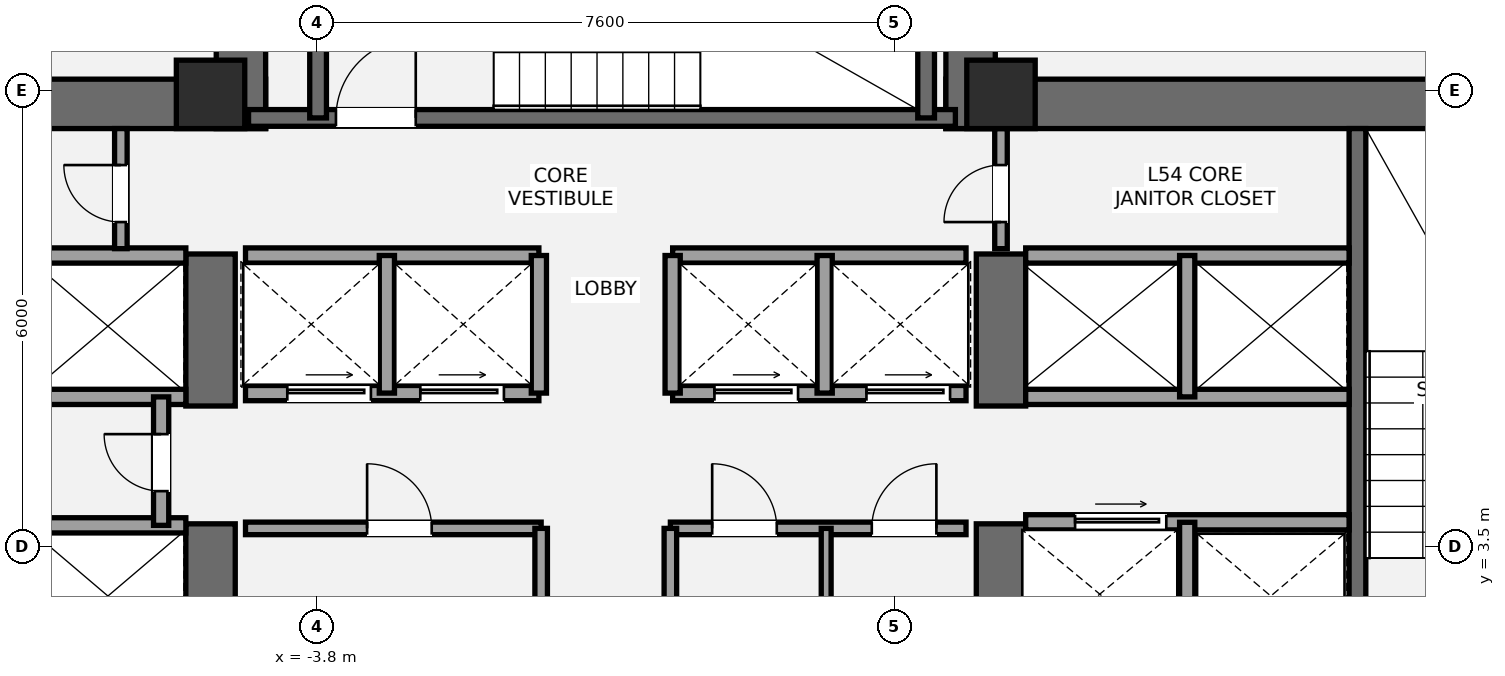
"""IFC4 building model, lengths in metres.
Left out: names, types, materials, properties, quantities, classifications, styles, units other than length and angle.
Written with IfcOpenShell. Run it as: python <this file> out.ifc"""

import sys

from ifc_helpers import new_model, si_unit, direction, frame, frame_2d, origin, origin_2d, place, context, subcontext, project, spatial, rectangle, extrude, element, fill, save


model = new_model("IFC4")
c1 = context("Model", 3, precision=1e-05, world=origin(), true_north=direction((0.0, 1.0)))
c2 = subcontext(c1, "Body", "Model", "MODEL_VIEW")
j1 = project(units=[si_unit("LENGTHUNIT", "METRE"), si_unit("PLANEANGLEUNIT", "RADIAN")], contexts=[c1])
p1 = place(None, origin())
s1 = spatial("IfcSite", under=j1, at=p1, CompositionType="ELEMENT")
p2 = place(p1, origin())
s2 = spatial("IfcBuilding", under=s1, at=p2, CompositionType="ELEMENT")
p3 = place(p2, frame((0.0, 0.0, 195.0)))
s3 = spatial("IfcBuildingStorey", under=s2, at=p3, CompositionType="ELEMENT", Elevation=195.0)
p4 = place(p3, frame((-13.8, 9.325, 0.0), z_axis=(0.0, 0.0, 1.0), x_axis=(1.0, 0.0, 0.0)))
e1 = element("IfcWall", 1, at=p4, inside=s3, PredefinedType="SHEAR", context=c2, shape_type="SweptSolid", body=[
    extrude(rectangle(XDim=9.325, YDim=0.65, at=frame_2d((4.663, 0.0))), origin(), (0.0, 0.0, 1.0), 3.2),
])
p5 = place(p3, frame((-5.2, 1.2, 0.0), z_axis=(0.0, 0.0, 1.0), x_axis=(0.0, 1.0, 0.0)))
e2 = element("IfcWall", 2, at=p5, inside=s3, PredefinedType="SHEAR", context=c2, shape_type="SweptSolid", body=[
    extrude(rectangle(XDim=2.6, YDim=0.65, at=frame_2d((1.3, 0.0))), origin(), (0.0, 0.0, 1.0), 3.2),
])
p6 = place(p3, frame((-5.2, 5.35, 0.0), z_axis=(0.0, 0.0, 1.0), x_axis=(0.0, 1.0, 0.0)))
e3 = element("IfcWall", 3, at=p6, inside=s3, PredefinedType="SHEAR", context=c2, shape_type="SweptSolid", body=[
    extrude(rectangle(XDim=2.0, YDim=0.65, at=frame_2d((1.0, 0.0))), origin(), (0.0, 0.0, 1.0), 3.2),
])
p7 = place(p3, frame((4.475, 9.325, 0.0), z_axis=(0.0, 0.0, 1.0), x_axis=(1.0, 0.0, 0.0)))
e4 = element("IfcWall", 4, at=p7, inside=s3, PredefinedType="SHEAR", context=c2, shape_type="SweptSolid", body=[
    extrude(rectangle(XDim=9.325, YDim=0.65, at=frame_2d((4.663, 0.0))), origin(), (0.0, 0.0, 1.0), 3.2),
])
p8 = place(p3, frame((5.2, 1.2, 0.0), z_axis=(0.0, 0.0, 1.0), x_axis=(0.0, 1.0, 0.0)))
e5 = element("IfcWall", 5, at=p8, inside=s3, PredefinedType="SHEAR", context=c2, shape_type="SweptSolid", body=[
    extrude(rectangle(XDim=2.6, YDim=0.65, at=frame_2d((1.3, 0.0))), origin(), (0.0, 0.0, 1.0), 3.2),
])
p9 = place(p3, frame((5.2, 5.35, 0.0), z_axis=(0.0, 0.0, 1.0), x_axis=(0.0, 1.0, 0.0)))
e6 = element("IfcWall", 6, at=p9, inside=s3, PredefinedType="SHEAR", context=c2, shape_type="SweptSolid", body=[
    extrude(rectangle(XDim=2.0, YDim=0.65, at=frame_2d((1.0, 0.0))), origin(), (0.0, 0.0, 1.0), 3.2),
])
p10 = place(p3, frame((9.89, 1.85, 0.0), z_axis=(0.0, 0.0, 1.0), x_axis=(0.0, 1.0, 0.0)))
e7 = element("IfcWall", 7, at=p10, inside=s3, PredefinedType="SHEAR", context=c2, shape_type="SweptSolid", body=[
    extrude(rectangle(XDim=7.15, YDim=0.22, at=frame_2d((3.575, 0.0))), origin(), (0.0, 0.0, 1.0), 3.2),
])
for number, where, z_axis, x_axis in (
    (8, (-4.8, 9.0, 0.0), (0.0, 0.0, 1.0), (0.0, 1.0, 0.0)),
    (9, (4.8, 9.0, 0.0), (0.0, 0.0, 1.0), (0.0, 1.0, 0.0)),
):
    element("IfcWall", number, at=place(p3, frame(where, z_axis=z_axis, x_axis=x_axis)), inside=s3, PredefinedType="SHEAR", context=c2, shape_type="SweptSolid", body=[
        extrude(rectangle(XDim=4.05, YDim=0.65, at=frame_2d((2.025, 0.0))), origin(), (0.0, 0.0, 1.0), 3.2),
    ])
p11 = place(p3, frame((-4.7, 9.14, 0.0), z_axis=(0.0, 0.0, 1.0), x_axis=(1.0, 0.0, 0.0)))
e10 = element("IfcWall", 10, at=p11, inside=s3, PredefinedType="SHEAR", context=c2, shape_type="SweptSolid", body=[
    extrude(rectangle(XDim=9.3, YDim=0.22, at=frame_2d((4.65, 0.0))), origin(), (0.0, 0.0, 1.0), 3.2),
])
p12 = place(p11, frame((1.15, 0.0, 0.0)))
e11 = element("IfcOpeningElement", 11, at=p12, cuts=e10, PredefinedType="OPENING", context=c2, shape_type="SweptSolid", body=[
    extrude(rectangle(XDim=1.05, YDim=2.15, at=frame_2d((0.525, 1.075))), frame((0.0, 0.12, 0.0), z_axis=(0.0, -1.0, 0.0), x_axis=(1.0, 0.0, 0.0)), (0.0, 0.0, 1.0), 0.24),
])
for number, where, z_axis, x_axis in (
    (12, (-3.785, 9.14, 0.0), (0.0, 0.0, 1.0), (0.0, 1.0, 0.0)),
    (13, (4.215, 9.14, 0.0), (0.0, 0.0, 1.0), (0.0, 1.0, 0.0)),
):
    element("IfcWall", number, at=place(p3, frame(where, z_axis=z_axis, x_axis=x_axis)), inside=s3, PredefinedType="SHEAR", context=c2, shape_type="SweptSolid", body=[
        extrude(rectangle(XDim=3.26, YDim=0.22, at=frame_2d((1.63, 0.0))), origin(), (0.0, 0.0, 1.0), 3.2),
    ])
for number, where, z_axis, x_axis in (
    (14, (-5.2, 9.45, 0.0), (0.0, 0.0, 1.0), (1.0, 0.0, 0.0)),
    (15, (5.2, 9.45, 0.0), (0.0, 0.0, 1.0), (1.0, 0.0, 0.0)),
):
    element("IfcColumn", number, at=place(p3, frame(where, z_axis=z_axis, x_axis=x_axis)), inside=s3, PredefinedType="COLUMN", context=c2, shape_type="SweptSolid", body=[
        extrude(rectangle(XDim=0.9, YDim=0.9, at=origin_2d()), origin(), (0.0, 0.0, 1.0), 3.2),
    ])
for number, where, z_axis, x_axis in (
    (16, (-9.78, 3.78, 0.0), (0.0, 0.0, 1.0), (1.0, 0.0, 0.0)),
    (17, (-9.78, 5.47, 0.0), (0.0, 0.0, 1.0), (1.0, 0.0, 0.0)),
    (18, (-9.78, 7.33, 0.0), (0.0, 0.0, 1.0), (1.0, 0.0, 0.0)),
):
    element("IfcWall", number, at=place(p3, frame(where, z_axis=z_axis, x_axis=x_axis)), inside=s3, PredefinedType="SOLIDWALL", context=c2, shape_type="SweptSolid", body=[
        extrude(rectangle(XDim=4.255, YDim=0.2, at=frame_2d((2.127, 0.0))), origin(), (0.0, 0.0, 1.0), 3.02),
    ])
p13 = place(p3, frame((-5.85, 3.78, 0.0), z_axis=(0.0, 0.0, 1.0), x_axis=(0.0, 1.0, 0.0)))
e19 = element("IfcWall", 19, at=p13, inside=s3, PredefinedType="SOLIDWALL", context=c2, shape_type="SweptSolid", body=[
    extrude(rectangle(XDim=1.69, YDim=0.2, at=frame_2d((0.845, 0.0))), origin(), (0.0, 0.0, 1.0), 3.02),
])
p14 = place(p13, frame((0.45, 0.0, 0.0)))
e20 = element("IfcOpeningElement", 20, at=p14, cuts=e19, PredefinedType="OPENING", context=c2, shape_type="SweptSolid", body=[
    extrude(rectangle(XDim=0.75, YDim=2.1, at=frame_2d((0.375, 1.05))), frame((0.0, 0.11, 0.0), z_axis=(0.0, -1.0, 0.0), x_axis=(1.0, 0.0, 0.0)), (0.0, 0.0, 1.0), 0.22),
])
p15 = place(p3, frame((5.525, 3.82, 0.0), z_axis=(0.0, 0.0, 1.0), x_axis=(1.0, 0.0, 0.0)))
e21 = element("IfcWall", 21, at=p15, inside=s3, PredefinedType="SOLIDWALL", context=c2, shape_type="SweptSolid", body=[
    extrude(rectangle(XDim=4.255, YDim=0.2, at=frame_2d((2.127, 0.0))), origin(), (0.0, 0.0, 1.0), 3.02),
])
p16 = place(p15, frame((0.65, 0.0, 0.0)))
e22 = element("IfcOpeningElement", 22, at=p16, cuts=e21, PredefinedType="OPENING", context=c2, shape_type="SweptSolid", body=[
    extrude(rectangle(XDim=1.2, YDim=2.2, at=frame_2d((0.6, 1.1))), frame((0.0, 0.11, 0.0), z_axis=(0.0, -1.0, 0.0), x_axis=(1.0, 0.0, 0.0)), (0.0, 0.0, 1.0), 0.22),
])
p17 = place(p3, frame((7.65, 1.85, 0.0), z_axis=(0.0, 0.0, 1.0), x_axis=(0.0, 1.0, 0.0)))
e23 = element("IfcWall", 23, at=p17, inside=s3, PredefinedType="SOLIDWALL", context=c2, shape_type="SweptSolid", body=[
    extrude(rectangle(XDim=1.97, YDim=0.2, at=frame_2d((0.985, 0.0))), origin(), (0.0, 0.0, 1.0), 3.02),
])
for number, where, z_axis, x_axis in (
    (24, (5.525, 5.47, 0.0), (0.0, 0.0, 1.0), (1.0, 0.0, 0.0)),
    (25, (5.525, 7.33, 0.0), (0.0, 0.0, 1.0), (1.0, 0.0, 0.0)),
):
    element("IfcWall", number, at=place(p3, frame(where, z_axis=z_axis, x_axis=x_axis)), inside=s3, PredefinedType="SOLIDWALL", context=c2, shape_type="SweptSolid", body=[
        extrude(rectangle(XDim=4.255, YDim=0.2, at=frame_2d((2.127, 0.0))), origin(), (0.0, 0.0, 1.0), 3.02),
    ])
p18 = place(p3, frame((7.65, 5.47, 0.0), z_axis=(0.0, 0.0, 1.0), x_axis=(0.0, 1.0, 0.0)))
e26 = element("IfcWall", 26, at=p18, inside=s3, PredefinedType="SOLIDWALL", context=c2, shape_type="SweptSolid", body=[
    extrude(rectangle(XDim=1.86, YDim=0.2, at=frame_2d((0.93, 0.0))), origin(), (0.0, 0.0, 1.0), 3.02),
])
p19 = place(p3, frame((-4.74, 3.74, 0.0), z_axis=(0.0, 0.0, 1.0), x_axis=(1.0, 0.0, 0.0)))
e27 = element("IfcWall", 27, at=p19, inside=s3, PredefinedType="PARTITIONING", context=c2, shape_type="SweptSolid", body=[
    extrude(rectangle(XDim=3.89, YDim=0.165, at=frame_2d((1.945, 0.0))), origin(), (0.0, 0.0, 1.0), 3.02),
])
p20 = place(p19, frame((1.6, 0.0, 0.0)))
e28 = element("IfcOpeningElement", 28, at=p20, cuts=e27, PredefinedType="OPENING", context=c2, shape_type="SweptSolid", body=[
    extrude(rectangle(XDim=0.85, YDim=2.1, at=frame_2d((0.425, 1.05))), frame((0.0, 0.093, 0.0), z_axis=(0.0, -1.0, 0.0), x_axis=(1.0, 0.0, 0.0)), (0.0, 0.0, 1.0), 0.185),
])
p21 = place(p3, frame((-0.85, 1.92, 0.0), z_axis=(0.0, 0.0, 1.0), x_axis=(0.0, 1.0, 0.0)))
e29 = element("IfcWall", 29, at=p21, inside=s3, PredefinedType="PARTITIONING", context=c2, shape_type="SweptSolid", body=[
    extrude(rectangle(XDim=1.82, YDim=0.165, at=frame_2d((0.91, 0.0))), origin(), (0.0, 0.0, 1.0), 3.02),
])
p22 = place(p3, frame((0.85, 3.74, 0.0), z_axis=(0.0, 0.0, 1.0), x_axis=(1.0, 0.0, 0.0)))
e30 = element("IfcWall", 30, at=p22, inside=s3, PredefinedType="PARTITIONING", context=c2, shape_type="SweptSolid", body=[
    extrude(rectangle(XDim=3.89, YDim=0.165, at=frame_2d((1.945, 0.0))), origin(), (0.0, 0.0, 1.0), 3.02),
])
p23 = place(p22, frame((0.55, 0.0, 0.0)))
e31 = element("IfcOpeningElement", 31, at=p23, cuts=e30, PredefinedType="OPENING", context=c2, shape_type="SweptSolid", body=[
    extrude(rectangle(XDim=0.85, YDim=2.1, at=frame_2d((0.425, 1.05))), frame((0.0, 0.093, 0.0), z_axis=(0.0, -1.0, 0.0), x_axis=(1.0, 0.0, 0.0)), (0.0, 0.0, 1.0), 0.185),
])
p24 = place(p22, frame((2.65, 0.0, 0.0)))
e32 = element("IfcOpeningElement", 32, at=p24, cuts=e30, PredefinedType="OPENING", context=c2, shape_type="SweptSolid", body=[
    extrude(rectangle(XDim=0.85, YDim=2.1, at=frame_2d((0.425, 1.05))), frame((0.0, 0.093, 0.0), z_axis=(0.0, -1.0, 0.0), x_axis=(1.0, 0.0, 0.0)), (0.0, 0.0, 1.0), 0.185),
])
p25 = place(p3, frame((0.85, 1.92, 0.0), z_axis=(0.0, 0.0, 1.0), x_axis=(0.0, 1.0, 0.0)))
e33 = element("IfcWall", 33, at=p25, inside=s3, PredefinedType="PARTITIONING", context=c2, shape_type="SweptSolid", body=[
    extrude(rectangle(XDim=1.82, YDim=0.165, at=frame_2d((0.91, 0.0))), origin(), (0.0, 0.0, 1.0), 3.02),
])
p26 = place(p3, frame((2.9, 1.92, 0.0), z_axis=(0.0, 0.0, 1.0), x_axis=(0.0, 1.0, 0.0)))
e34 = element("IfcWall", 34, at=p26, inside=s3, PredefinedType="PARTITIONING", context=c2, shape_type="SweptSolid", body=[
    extrude(rectangle(XDim=1.82, YDim=0.13, at=frame_2d((0.91, 0.0))), origin(), (0.0, 0.0, 1.0), 3.02),
])
p27 = place(p3, frame((-4.74, 5.52, 0.0), z_axis=(0.0, 0.0, 1.0), x_axis=(1.0, 0.0, 0.0)))
e35 = element("IfcWall", 35, at=p27, inside=s3, PredefinedType="SOLIDWALL", context=c2, shape_type="SweptSolid", body=[
    extrude(rectangle(XDim=3.86, YDim=0.2, at=frame_2d((1.93, 0.0))), origin(), (0.0, 0.0, 1.0), 3.02),
])
p28 = place(p27, frame((0.55, 0.0, 0.0)))
e36 = element("IfcOpeningElement", 36, at=p28, cuts=e35, PredefinedType="OPENING", context=c2, shape_type="SweptSolid", body=[
    extrude(rectangle(XDim=1.1, YDim=2.2, at=frame_2d((0.55, 1.1))), frame((0.0, 0.11, 0.0), z_axis=(0.0, -1.0, 0.0), x_axis=(1.0, 0.0, 0.0)), (0.0, 0.0, 1.0), 0.22),
])
p29 = place(p27, frame((2.3, 0.0, 0.0)))
e37 = element("IfcOpeningElement", 37, at=p29, cuts=e35, PredefinedType="OPENING", context=c2, shape_type="SweptSolid", body=[
    extrude(rectangle(XDim=1.1, YDim=2.2, at=frame_2d((0.55, 1.1))), frame((0.0, 0.11, 0.0), z_axis=(0.0, -1.0, 0.0), x_axis=(1.0, 0.0, 0.0)), (0.0, 0.0, 1.0), 0.22),
])
p30 = place(p3, frame((0.88, 5.52, 0.0), z_axis=(0.0, 0.0, 1.0), x_axis=(1.0, 0.0, 0.0)))
e38 = element("IfcWall", 38, at=p30, inside=s3, PredefinedType="SOLIDWALL", context=c2, shape_type="SweptSolid", body=[
    extrude(rectangle(XDim=3.86, YDim=0.2, at=frame_2d((1.93, 0.0))), origin(), (0.0, 0.0, 1.0), 3.02),
])
p31 = place(p30, frame((0.55, 0.0, 0.0)))
e39 = element("IfcOpeningElement", 39, at=p31, cuts=e38, PredefinedType="OPENING", context=c2, shape_type="SweptSolid", body=[
    extrude(rectangle(XDim=1.1, YDim=2.2, at=frame_2d((0.55, 1.1))), frame((0.0, 0.11, 0.0), z_axis=(0.0, -1.0, 0.0), x_axis=(1.0, 0.0, 0.0)), (0.0, 0.0, 1.0), 0.22),
])
p32 = place(p30, frame((2.55, 0.0, 0.0)))
e40 = element("IfcOpeningElement", 40, at=p32, cuts=e38, PredefinedType="OPENING", context=c2, shape_type="SweptSolid", body=[
    extrude(rectangle(XDim=1.1, YDim=2.2, at=frame_2d((0.55, 1.1))), frame((0.0, 0.11, 0.0), z_axis=(0.0, -1.0, 0.0), x_axis=(1.0, 0.0, 0.0)), (0.0, 0.0, 1.0), 0.22),
])
for number, where, z_axis, x_axis in (
    (41, (-4.74, 7.33, 0.0), (0.0, 0.0, 1.0), (1.0, 0.0, 0.0)),
    (42, (0.88, 7.33, 0.0), (0.0, 0.0, 1.0), (1.0, 0.0, 0.0)),
):
    element("IfcWall", number, at=place(p3, frame(where, z_axis=z_axis, x_axis=x_axis)), inside=s3, PredefinedType="SOLIDWALL", context=c2, shape_type="SweptSolid", body=[
        extrude(rectangle(XDim=3.86, YDim=0.2, at=frame_2d((1.93, 0.0))), origin(), (0.0, 0.0, 1.0), 3.02),
    ])
for number, where, z_axis, x_axis in (
    (43, (-2.88, 5.52, 0.0), (0.0, 0.0, 1.0), (0.0, 1.0, 0.0)),
    (44, (2.88, 5.52, 0.0), (0.0, 0.0, 1.0), (0.0, 1.0, 0.0)),
    (45, (-0.88, 5.52, 0.0), (0.0, 0.0, 1.0), (0.0, 1.0, 0.0)),
    (46, (0.88, 5.52, 0.0), (0.0, 0.0, 1.0), (0.0, 1.0, 0.0)),
):
    element("IfcWall", number, at=place(p3, frame(where, z_axis=z_axis, x_axis=x_axis)), inside=s3, PredefinedType="SOLIDWALL", context=c2, shape_type="SweptSolid", body=[
        extrude(rectangle(XDim=1.81, YDim=0.2, at=frame_2d((0.905, 0.0))), origin(), (0.0, 0.0, 1.0), 3.02),
    ])
p33 = place(p3, frame((-6.38, 7.42, 0.0), z_axis=(0.0, 0.0, 1.0), x_axis=(0.0, 1.0, 0.0)))
e47 = element("IfcWall", 47, at=p33, inside=s3, PredefinedType="PARTITIONING", context=c2, shape_type="SweptSolid", body=[
    extrude(rectangle(XDim=1.58, YDim=0.165, at=frame_2d((0.79, 0.0))), origin(), (0.0, 0.0, 1.0), 3.02),
])
p34 = place(p33, frame((0.35, 0.0, 0.0)))
e48 = element("IfcOpeningElement", 48, at=p34, cuts=e47, PredefinedType="OPENING", context=c2, shape_type="SweptSolid", body=[
    extrude(rectangle(XDim=0.75, YDim=2.1, at=frame_2d((0.375, 1.05))), frame((0.0, 0.093, 0.0), z_axis=(0.0, -1.0, 0.0), x_axis=(1.0, 0.0, 0.0)), (0.0, 0.0, 1.0), 0.185),
])
p35 = place(p3, frame((5.2, 7.42, 0.0), z_axis=(0.0, 0.0, 1.0), x_axis=(0.0, 1.0, 0.0)))
e49 = element("IfcWall", 49, at=p35, inside=s3, PredefinedType="PARTITIONING", context=c2, shape_type="SweptSolid", body=[
    extrude(rectangle(XDim=1.58, YDim=0.165, at=frame_2d((0.79, 0.0))), origin(), (0.0, 0.0, 1.0), 3.02),
])
p36 = place(p35, frame((0.35, 0.0, 0.0)))
e50 = element("IfcOpeningElement", 50, at=p36, cuts=e49, PredefinedType="OPENING", context=c2, shape_type="SweptSolid", body=[
    extrude(rectangle(XDim=0.75, YDim=2.1, at=frame_2d((0.375, 1.05))), frame((0.0, 0.093, 0.0), z_axis=(0.0, -1.0, 0.0), x_axis=(1.0, 0.0, 0.0)), (0.0, 0.0, 1.0), 0.185),
])
p37 = place(p12, origin())
e51 = element("IfcDoor", 51, at=p37, inside=s3, OperationType="SINGLE_SWING_RIGHT", PredefinedType="DOOR", context=c2, shape_type="SweptSolid", body=[
    extrude(rectangle(XDim=1.05, YDim=2.15, at=frame_2d((0.525, 1.075))), frame((0.0, 0.025, 0.0), z_axis=(0.0, -1.0, 0.0), x_axis=(1.0, 0.0, 0.0)), (0.0, 0.0, 1.0), 0.05),
])
fill(e11, e51)
p38 = place(p14, origin())
e52 = element("IfcDoor", 52, at=p38, inside=s3, OperationType="SINGLE_SWING_RIGHT", PredefinedType="DOOR", context=c2, shape_type="SweptSolid", body=[
    extrude(rectangle(XDim=0.75, YDim=2.1, at=frame_2d((0.375, 1.05))), frame((0.0, 0.025, 0.0), z_axis=(0.0, -1.0, 0.0), x_axis=(1.0, 0.0, 0.0)), (0.0, 0.0, 1.0), 0.05),
])
fill(e20, e52)
p39 = place(p16, origin())
e53 = element("IfcDoor", 53, at=p39, inside=s3, OperationType="SLIDING_TO_RIGHT", PredefinedType="DOOR", context=c2, shape_type="SweptSolid", body=[
    extrude(rectangle(XDim=1.2, YDim=2.2, at=frame_2d((0.6, 1.1))), frame((0.0, 0.025, 0.0), z_axis=(0.0, -1.0, 0.0), x_axis=(1.0, 0.0, 0.0)), (0.0, 0.0, 1.0), 0.05),
])
fill(e22, e53)
p40 = place(p20, origin())
e54 = element("IfcDoor", 54, at=p40, inside=s3, OperationType="SINGLE_SWING_LEFT", PredefinedType="DOOR", context=c2, shape_type="SweptSolid", body=[
    extrude(rectangle(XDim=0.85, YDim=2.1, at=frame_2d((0.425, 1.05))), frame((0.0, 0.025, 0.0), z_axis=(0.0, -1.0, 0.0), x_axis=(1.0, 0.0, 0.0)), (0.0, 0.0, 1.0), 0.05),
])
fill(e28, e54)
p41 = place(p23, origin())
e55 = element("IfcDoor", 55, at=p41, inside=s3, OperationType="SINGLE_SWING_LEFT", PredefinedType="DOOR", context=c2, shape_type="SweptSolid", body=[
    extrude(rectangle(XDim=0.85, YDim=2.1, at=frame_2d((0.425, 1.05))), frame((0.0, 0.025, 0.0), z_axis=(0.0, -1.0, 0.0), x_axis=(1.0, 0.0, 0.0)), (0.0, 0.0, 1.0), 0.05),
])
fill(e31, e55)
p42 = place(p24, origin())
e56 = element("IfcDoor", 56, at=p42, inside=s3, OperationType="SINGLE_SWING_RIGHT", PredefinedType="DOOR", context=c2, shape_type="SweptSolid", body=[
    extrude(rectangle(XDim=0.85, YDim=2.1, at=frame_2d((0.425, 1.05))), frame((0.0, 0.025, 0.0), z_axis=(0.0, -1.0, 0.0), x_axis=(1.0, 0.0, 0.0)), (0.0, 0.0, 1.0), 0.05),
])
fill(e32, e56)
p43 = place(p28, origin())
e57 = element("IfcDoor", 57, at=p43, inside=s3, OperationType="SLIDING_TO_LEFT", PredefinedType="DOOR", context=c2, shape_type="SweptSolid", body=[
    extrude(rectangle(XDim=1.1, YDim=2.2, at=frame_2d((0.55, 1.1))), frame((0.0, 0.025, 0.0), z_axis=(0.0, -1.0, 0.0), x_axis=(1.0, 0.0, 0.0)), (0.0, 0.0, 1.0), 0.05),
])
fill(e36, e57)
p44 = place(p29, origin())
e58 = element("IfcDoor", 58, at=p44, inside=s3, OperationType="SLIDING_TO_LEFT", PredefinedType="DOOR", context=c2, shape_type="SweptSolid", body=[
    extrude(rectangle(XDim=1.1, YDim=2.2, at=frame_2d((0.55, 1.1))), frame((0.0, 0.025, 0.0), z_axis=(0.0, -1.0, 0.0), x_axis=(1.0, 0.0, 0.0)), (0.0, 0.0, 1.0), 0.05),
])
fill(e37, e58)
p45 = place(p31, origin())
e59 = element("IfcDoor", 59, at=p45, inside=s3, OperationType="SLIDING_TO_LEFT", PredefinedType="DOOR", context=c2, shape_type="SweptSolid", body=[
    extrude(rectangle(XDim=1.1, YDim=2.2, at=frame_2d((0.55, 1.1))), frame((0.0, 0.025, 0.0), z_axis=(0.0, -1.0, 0.0), x_axis=(1.0, 0.0, 0.0)), (0.0, 0.0, 1.0), 0.05),
])
fill(e39, e59)
p46 = place(p32, origin())
e60 = element("IfcDoor", 60, at=p46, inside=s3, OperationType="SLIDING_TO_LEFT", PredefinedType="DOOR", context=c2, shape_type="SweptSolid", body=[
    extrude(rectangle(XDim=1.1, YDim=2.2, at=frame_2d((0.55, 1.1))), frame((0.0, 0.025, 0.0), z_axis=(0.0, -1.0, 0.0), x_axis=(1.0, 0.0, 0.0)), (0.0, 0.0, 1.0), 0.05),
])
fill(e40, e60)
p47 = place(p34, origin())
e61 = element("IfcDoor", 61, at=p47, inside=s3, OperationType="SINGLE_SWING_RIGHT", PredefinedType="DOOR", context=c2, shape_type="SweptSolid", body=[
    extrude(rectangle(XDim=0.75, YDim=2.1, at=frame_2d((0.375, 1.05))), frame((0.0, 0.025, 0.0), z_axis=(0.0, -1.0, 0.0), x_axis=(1.0, 0.0, 0.0)), (0.0, 0.0, 1.0), 0.05),
])
fill(e48, e61)
p48 = place(p36, origin())
e62 = element("IfcDoor", 62, at=p48, inside=s3, OperationType="SINGLE_SWING_LEFT", PredefinedType="DOOR", context=c2, shape_type="SweptSolid", body=[
    extrude(rectangle(XDim=0.75, YDim=2.1, at=frame_2d((0.375, 1.05))), frame((0.0, 0.025, 0.0), z_axis=(0.0, -1.0, 0.0), x_axis=(1.0, 0.0, 0.0)), (0.0, 0.0, 1.0), 0.05),
])
fill(e50, e62)
save(model, sys.argv[1])
